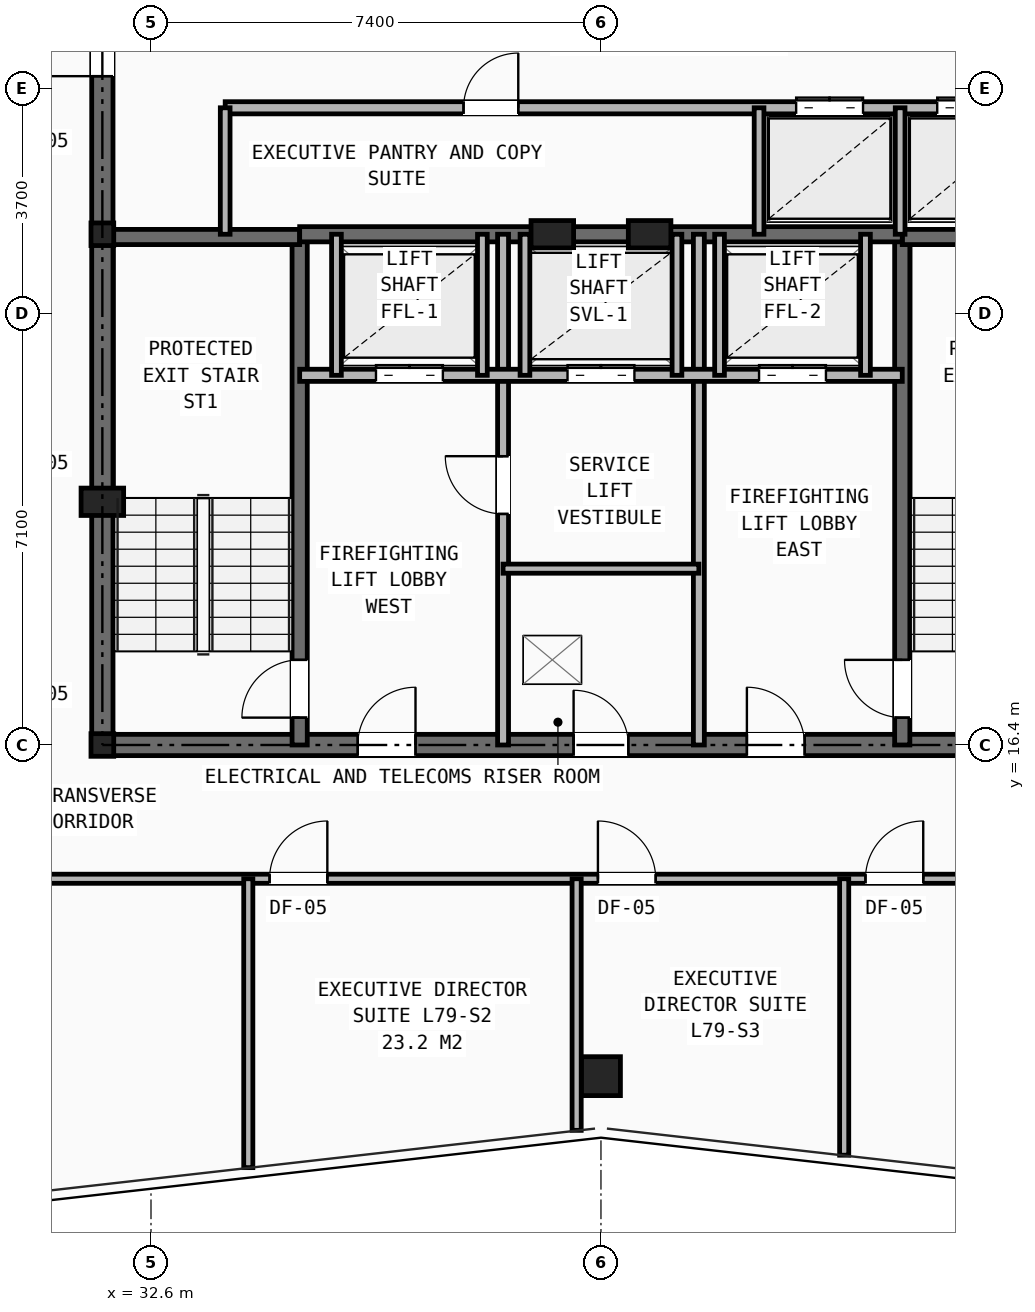
"""IFC4 building model, lengths in metres.
Left out: names, types, materials, properties, quantities, classifications, styles, units other than length and angle.
Written with IfcOpenShell. Run it as: python <this file> out.ifc"""

import sys

from ifc_helpers import new_model, si_unit, direction, frame, frame_2d, origin, origin_2d, place, context, subcontext, project, spatial, rectangle, hollow_rectangle, i_section, extrude, element, fill, save


model = new_model("IFC4")
c1 = context("Model", 3, precision=1e-05, world=origin(), true_north=direction((0.0, 1.0)))
c2 = subcontext(c1, "Body", "Model", "MODEL_VIEW")
j1 = project(units=[si_unit("LENGTHUNIT", "METRE"), si_unit("PLANEANGLEUNIT", "RADIAN")], contexts=[c1])
p1 = place(None, origin())
s1 = spatial("IfcSite", under=j1, at=p1, CompositionType="ELEMENT")
p2 = place(p1, origin())
s2 = spatial("IfcBuilding", under=s1, at=p2, CompositionType="ELEMENT")
p3 = place(p2, frame((0.0, 0.0, 279.5)))
s3 = spatial("IfcBuildingStorey", under=s2, at=p3, CompositionType="ELEMENT", Elevation=279.5)
for number, where, z_axis, x_axis in (
    (1, (31.8, 16.4, 0.0), (0.0, 0.0, 1.0), (1.0, 0.0, 0.0)),
    (2, (31.8, 24.8, 0.0), (0.0, 0.0, 1.0), (1.0, 0.0, 0.0)),
):
    element("IfcColumn", number, at=place(p3, frame(where, z_axis=z_axis, x_axis=x_axis)), inside=s3, PredefinedType="COLUMN", context=c2, shape_type="SweptSolid", body=[
        extrude(i_section(OverallWidth=0.374, OverallDepth=0.372, WebThickness=0.016, FlangeThickness=0.026, at=origin_2d()), origin(), (0.0, 0.0, 1.0), 3.5),
    ])
for number, where, z_axis, x_axis in (
    (3, (31.8, 20.4, 0.0), (0.0, 0.0, 1.0), (1.0, 0.0, 0.0)),
    (4, (39.2, 24.8, 0.0), (0.0, 0.0, 1.0), (1.0, 0.0, 0.0)),
    (5, (40.8, 24.8, 0.0), (0.0, 0.0, 1.0), (1.0, 0.0, 0.0)),
):
    element("IfcColumn", number, at=place(p3, frame(where, z_axis=z_axis, x_axis=x_axis)), inside=s3, PredefinedType="PILASTER", context=c2, shape_type="SweptSolid", body=[
        extrude(rectangle(XDim=0.7, YDim=0.45, at=origin_2d()), origin(), (0.0, 0.0, 1.0), 3.5),
    ])
p4 = place(p3, frame((40.0, 10.953, 0.0), z_axis=(0.0, 0.0, 1.0), x_axis=(1.0, 0.0, 0.0)))
e6 = element("IfcColumn", 6, at=p4, inside=s3, PredefinedType="COLUMN", context=c2, shape_type="SweptSolid", body=[
    extrude(hollow_rectangle(XDim=0.64, YDim=0.64, WallThickness=0.045, at=origin_2d()), origin(), (0.0, 0.0, 1.0), 3.5),
])
p5 = place(p3, frame((31.8, 16.4, 0.0), z_axis=(0.0, 0.0, 1.0), x_axis=(1.0, 0.0, 0.0)))
e7 = element("IfcWall", 7, at=p5, inside=s3, PredefinedType="SHEAR", context=c2, shape_type="SweptSolid", body=[
    extrude(rectangle(XDim=16.4, YDim=0.35, at=frame_2d((8.2, 0.0))), origin(), (0.0, 0.0, 1.0), 3.25),
])
p6 = place(p5, frame((7.75, 0.0, 0.0)))
e8 = element("IfcOpeningElement", 8, at=p6, cuts=e7, PredefinedType="OPENING", context=c2, shape_type="SweptSolid", body=[
    extrude(rectangle(XDim=0.9, YDim=2.1, at=frame_2d((0.45, 1.05))), frame((0.0, 0.185, 0.0), z_axis=(0.0, -1.0, 0.0), x_axis=(1.0, 0.0, 0.0)), (0.0, 0.0, 1.0), 0.37),
])
p7 = place(p5, frame((4.2, 0.0, 0.0)))
e9 = element("IfcOpeningElement", 9, at=p7, cuts=e7, PredefinedType="OPENING", context=c2, shape_type="SweptSolid", body=[
    extrude(rectangle(XDim=0.95, YDim=2.1, at=frame_2d((0.475, 1.05))), frame((0.0, 0.185, 0.0), z_axis=(0.0, -1.0, 0.0), x_axis=(1.0, 0.0, 0.0)), (0.0, 0.0, 1.0), 0.37),
])
p8 = place(p5, frame((10.6, 0.0, 0.0)))
e10 = element("IfcOpeningElement", 10, at=p8, cuts=e7, PredefinedType="OPENING", context=c2, shape_type="SweptSolid", body=[
    extrude(rectangle(XDim=0.95, YDim=2.1, at=frame_2d((0.475, 1.05))), frame((0.0, 0.185, 0.0), z_axis=(0.0, -1.0, 0.0), x_axis=(1.0, 0.0, 0.0)), (0.0, 0.0, 1.0), 0.37),
])
p9 = place(p3, frame((31.8, 16.4, 0.0), z_axis=(0.0, 0.0, 1.0), x_axis=(0.0, 1.0, 0.0)))
e11 = element("IfcWall", 11, at=p9, inside=s3, PredefinedType="SHEAR", context=c2, shape_type="SweptSolid", body=[
    extrude(rectangle(XDim=14.8, YDim=0.35, at=frame_2d((7.4, 0.0))), origin(), (0.0, 0.0, 1.0), 3.25),
])
p10 = place(p9, frame((11.0, 0.0, 0.0)))
e12 = element("IfcOpeningElement", 12, at=p10, cuts=e11, PredefinedType="OPENING", context=c2, shape_type="SweptSolid", body=[
    extrude(rectangle(XDim=1.1, YDim=2.15, at=frame_2d((0.55, 1.075))), frame((0.0, 0.185, 0.0), z_axis=(0.0, -1.0, 0.0), x_axis=(1.0, 0.0, 0.0)), (0.0, 0.0, 1.0), 0.37),
])
p11 = place(p3, frame((35.045, 16.4, 0.0), z_axis=(0.0, 0.0, 1.0), x_axis=(0.0, 1.0, 0.0)))
e13 = element("IfcWall", 13, at=p11, inside=s3, PredefinedType="SHEAR", context=c2, shape_type="SweptSolid", body=[
    extrude(rectangle(XDim=8.4, YDim=0.25, at=frame_2d((4.2, 0.0))), origin(), (0.0, 0.0, 1.0), 3.25),
])
p12 = place(p11, frame((0.45, 0.0, 0.0)))
e14 = element("IfcOpeningElement", 14, at=p12, cuts=e13, PredefinedType="OPENING", context=c2, shape_type="SweptSolid", body=[
    extrude(rectangle(XDim=0.95, YDim=2.1, at=frame_2d((0.475, 1.05))), frame((0.0, 0.135, 0.0), z_axis=(0.0, -1.0, 0.0), x_axis=(1.0, 0.0, 0.0)), (0.0, 0.0, 1.0), 0.27),
])
p13 = place(p3, frame((31.8, 24.755, 0.0), z_axis=(0.0, 0.0, 1.0), x_axis=(1.0, 0.0, 0.0)))
e15 = element("IfcWall", 15, at=p13, inside=s3, PredefinedType="SHEAR", context=c2, shape_type="SweptSolid", body=[
    extrude(rectangle(XDim=3.245, YDim=0.25, at=frame_2d((1.623, 0.0))), origin(), (0.0, 0.0, 1.0), 3.25),
])
p14 = place(p3, frame((44.955, 16.4, 0.0), z_axis=(0.0, 0.0, 1.0), x_axis=(0.0, 1.0, 0.0)))
e16 = element("IfcWall", 16, at=p14, inside=s3, PredefinedType="SHEAR", context=c2, shape_type="SweptSolid", body=[
    extrude(rectangle(XDim=8.4, YDim=0.25, at=frame_2d((4.2, 0.0))), origin(), (0.0, 0.0, 1.0), 3.25),
])
p15 = place(p14, frame((0.45, 0.0, 0.0)))
e17 = element("IfcOpeningElement", 17, at=p15, cuts=e16, PredefinedType="OPENING", context=c2, shape_type="SweptSolid", body=[
    extrude(rectangle(XDim=0.95, YDim=2.1, at=frame_2d((0.475, 1.05))), frame((0.0, 0.135, 0.0), z_axis=(0.0, -1.0, 0.0), x_axis=(1.0, 0.0, 0.0)), (0.0, 0.0, 1.0), 0.27),
])
p16 = place(p3, frame((44.955, 24.755, 0.0), z_axis=(0.0, 0.0, 1.0), x_axis=(1.0, 0.0, 0.0)))
e18 = element("IfcWall", 18, at=p16, inside=s3, PredefinedType="SHEAR", context=c2, shape_type="SweptSolid", body=[
    extrude(rectangle(XDim=3.245, YDim=0.25, at=frame_2d((1.623, 0.0))), origin(), (0.0, 0.0, 1.0), 3.25),
])
p17 = place(p3, frame((35.045, 24.8, 0.0), z_axis=(0.0, 0.0, 1.0), x_axis=(1.0, 0.0, 0.0)))
e19 = element("IfcWall", 19, at=p17, inside=s3, PredefinedType="SHEAR", context=c2, shape_type="SweptSolid", body=[
    extrude(rectangle(XDim=9.91, YDim=0.25, at=frame_2d((4.955, 0.0))), origin(), (0.0, 0.0, 1.0), 3.25),
])
p18 = place(p3, frame((38.39, 16.4, 0.0), z_axis=(0.0, 0.0, 1.0), x_axis=(0.0, 1.0, 0.0)))
e20 = element("IfcWall", 20, at=p18, inside=s3, PredefinedType="PARTITIONING", context=c2, shape_type="SweptSolid", body=[
    extrude(rectangle(XDim=8.4, YDim=0.18, at=frame_2d((4.2, 0.0))), origin(), (0.0, 0.0, 1.0), 2.705),
])
p19 = place(p18, frame((3.8, 0.0, 0.0)))
e21 = element("IfcOpeningElement", 21, at=p19, cuts=e20, PredefinedType="OPENING", context=c2, shape_type="SweptSolid", body=[
    extrude(rectangle(XDim=0.95, YDim=2.1, at=frame_2d((0.475, 1.05))), frame((0.0, 0.1, 0.0), z_axis=(0.0, -1.0, 0.0), x_axis=(1.0, 0.0, 0.0)), (0.0, 0.0, 1.0), 0.2),
])
p20 = place(p3, frame((41.61, 16.4, 0.0), z_axis=(0.0, 0.0, 1.0), x_axis=(0.0, 1.0, 0.0)))
e22 = element("IfcWall", 22, at=p20, inside=s3, PredefinedType="PARTITIONING", context=c2, shape_type="SweptSolid", body=[
    extrude(rectangle(XDim=8.4, YDim=0.18, at=frame_2d((4.2, 0.0))), origin(), (0.0, 0.0, 1.0), 2.705),
])
p21 = place(p3, frame((35.045, 22.48, 0.0), z_axis=(0.0, 0.0, 1.0), x_axis=(1.0, 0.0, 0.0)))
e23 = element("IfcWall", 23, at=p21, inside=s3, PredefinedType="SOLIDWALL", context=c2, shape_type="SweptSolid", body=[
    extrude(rectangle(XDim=9.91, YDim=0.2, at=frame_2d((4.955, 0.0))), origin(), (0.0, 0.0, 1.0), 3.25),
])
p22 = place(p21, frame((1.255, 0.0, 0.0)))
e24 = element("IfcOpeningElement", 24, at=p22, cuts=e23, PredefinedType="OPENING", context=c2, shape_type="SweptSolid", body=[
    extrude(rectangle(XDim=1.1, YDim=2.15, at=frame_2d((0.55, 1.075))), frame((0.0, 0.11, 0.0), z_axis=(0.0, -1.0, 0.0), x_axis=(1.0, 0.0, 0.0)), (0.0, 0.0, 1.0), 0.22),
])
p23 = place(p21, frame((7.555, 0.0, 0.0)))
e25 = element("IfcOpeningElement", 25, at=p23, cuts=e23, PredefinedType="OPENING", context=c2, shape_type="SweptSolid", body=[
    extrude(rectangle(XDim=1.1, YDim=2.15, at=frame_2d((0.55, 1.075))), frame((0.0, 0.11, 0.0), z_axis=(0.0, -1.0, 0.0), x_axis=(1.0, 0.0, 0.0)), (0.0, 0.0, 1.0), 0.22),
])
p24 = place(p21, frame((4.405, 0.0, 0.0)))
e26 = element("IfcOpeningElement", 26, at=p24, cuts=e23, PredefinedType="OPENING", context=c2, shape_type="SweptSolid", body=[
    extrude(rectangle(XDim=1.1, YDim=2.15, at=frame_2d((0.55, 1.075))), frame((0.0, 0.11, 0.0), z_axis=(0.0, -1.0, 0.0), x_axis=(1.0, 0.0, 0.0)), (0.0, 0.0, 1.0), 0.22),
])
p25 = place(p3, frame((38.39, 19.3, 0.0), z_axis=(0.0, 0.0, 1.0), x_axis=(1.0, 0.0, 0.0)))
e27 = element("IfcWall", 27, at=p25, inside=s3, PredefinedType="PARTITIONING", context=c2, shape_type="SweptSolid", body=[
    extrude(rectangle(XDim=3.22, YDim=0.15, at=frame_2d((1.61, 0.0))), origin(), (0.0, 0.0, 1.0), 3.25),
])
for number, where, z_axis, x_axis in (
    (28, (35.65, 22.48, 0.0), (0.0, 0.0, 1.0), (0.0, 1.0, 0.0)),
    (29, (38.05, 22.48, 0.0), (0.0, 0.0, 1.0), (0.0, 1.0, 0.0)),
    (30, (41.95, 22.48, 0.0), (0.0, 0.0, 1.0), (0.0, 1.0, 0.0)),
    (31, (44.35, 22.48, 0.0), (0.0, 0.0, 1.0), (0.0, 1.0, 0.0)),
    (32, (38.75, 22.48, 0.0), (0.0, 0.0, 1.0), (0.0, 1.0, 0.0)),
    (33, (41.25, 22.48, 0.0), (0.0, 0.0, 1.0), (0.0, 1.0, 0.0)),
):
    element("IfcWall", number, at=place(p3, frame(where, z_axis=z_axis, x_axis=x_axis)), inside=s3, PredefinedType="SOLIDWALL", context=c2, shape_type="SweptSolid", body=[
        extrude(rectangle(XDim=2.32, YDim=0.16, at=frame_2d((1.16, 0.0))), origin(), (0.0, 0.0, 1.0), 3.25),
    ])
p26 = place(p3, frame((33.82, 26.88, 0.0), z_axis=(0.0, 0.0, 1.0), x_axis=(1.0, 0.0, 0.0)))
e34 = element("IfcWall", 34, at=p26, inside=s3, PredefinedType="SOLIDWALL", context=c2, shape_type="SweptSolid", body=[
    extrude(rectangle(XDim=14.38, YDim=0.2, at=frame_2d((7.19, 0.0))), origin(), (0.0, 0.0, 1.0), 2.705),
])
p27 = place(p26, frame((3.92, 0.0, 0.0)))
e35 = element("IfcOpeningElement", 35, at=p27, cuts=e34, PredefinedType="OPENING", context=c2, shape_type="SweptSolid", body=[
    extrude(rectangle(XDim=0.9, YDim=2.1, at=frame_2d((0.45, 1.05))), frame((0.0, 0.11, 0.0), z_axis=(0.0, -1.0, 0.0), x_axis=(1.0, 0.0, 0.0)), (0.0, 0.0, 1.0), 0.22),
])
p28 = place(p26, frame((9.39, 0.0, 0.0)))
e36 = element("IfcOpeningElement", 36, at=p28, cuts=e34, PredefinedType="OPENING", context=c2, shape_type="SweptSolid", body=[
    extrude(rectangle(XDim=1.1, YDim=2.15, at=frame_2d((0.55, 1.075))), frame((0.0, 0.11, 0.0), z_axis=(0.0, -1.0, 0.0), x_axis=(1.0, 0.0, 0.0)), (0.0, 0.0, 1.0), 0.22),
])
p29 = place(p26, frame((11.71, 0.0, 0.0)))
e37 = element("IfcOpeningElement", 37, at=p29, cuts=e34, PredefinedType="OPENING", context=c2, shape_type="SweptSolid", body=[
    extrude(rectangle(XDim=1.1, YDim=2.15, at=frame_2d((0.55, 1.075))), frame((0.0, 0.11, 0.0), z_axis=(0.0, -1.0, 0.0), x_axis=(1.0, 0.0, 0.0)), (0.0, 0.0, 1.0), 0.22),
])
for number, where, z_axis, x_axis in (
    (38, (33.82, 24.8, 0.0), (0.0, 0.0, 1.0), (0.0, 1.0, 0.0)),
    (39, (42.6, 24.8, 0.0), (0.0, 0.0, 1.0), (0.0, 1.0, 0.0)),
    (40, (44.92, 24.8, 0.0), (0.0, 0.0, 1.0), (0.0, 1.0, 0.0)),
):
    element("IfcWall", number, at=place(p3, frame(where, z_axis=z_axis, x_axis=x_axis)), inside=s3, PredefinedType="SOLIDWALL", context=c2, shape_type="SweptSolid", body=[
        extrude(rectangle(XDim=2.08, YDim=0.16, at=frame_2d((1.04, 0.0))), origin(), (0.0, 0.0, 1.0), 3.25),
    ])
p30 = place(p3, frame((25.5, 14.2, 0.0), z_axis=(0.0, 0.0, 1.0), x_axis=(1.0, 0.0, 0.0)))
e41 = element("IfcWall", 41, at=p30, inside=s3, PredefinedType="PARTITIONING", context=c2, shape_type="SweptSolid", body=[
    extrude(rectangle(XDim=29.0, YDim=0.15, at=frame_2d((14.5, 0.0))), origin(), (0.0, 0.0, 1.0), 2.292),
])
p31 = place(p30, frame((0.85, 0.0, 0.0)))
e42 = element("IfcOpeningElement", 42, at=p31, cuts=e41, PredefinedType="OPENING", context=c2, shape_type="SweptSolid", body=[
    extrude(rectangle(XDim=0.95, YDim=2.1, at=frame_2d((0.475, 1.05))), frame((0.0, 0.085, 0.0), z_axis=(0.0, -1.0, 0.0), x_axis=(1.0, 0.0, 0.0)), (0.0, 0.0, 1.0), 0.17),
])
p32 = place(p30, frame((9.05, 0.0, 0.0)))
e43 = element("IfcOpeningElement", 43, at=p32, cuts=e41, PredefinedType="OPENING", context=c2, shape_type="SweptSolid", body=[
    extrude(rectangle(XDim=0.95, YDim=2.1, at=frame_2d((0.475, 1.05))), frame((0.0, 0.085, 0.0), z_axis=(0.0, -1.0, 0.0), x_axis=(1.0, 0.0, 0.0)), (0.0, 0.0, 1.0), 0.17),
])
p33 = place(p30, frame((14.45, 0.0, 0.0)))
e44 = element("IfcOpeningElement", 44, at=p33, cuts=e41, PredefinedType="OPENING", context=c2, shape_type="SweptSolid", body=[
    extrude(rectangle(XDim=0.95, YDim=2.1, at=frame_2d((0.475, 1.05))), frame((0.0, 0.085, 0.0), z_axis=(0.0, -1.0, 0.0), x_axis=(1.0, 0.0, 0.0)), (0.0, 0.0, 1.0), 0.17),
])
p34 = place(p30, frame((18.85, 0.0, 0.0)))
e45 = element("IfcOpeningElement", 45, at=p34, cuts=e41, PredefinedType="OPENING", context=c2, shape_type="SweptSolid", body=[
    extrude(rectangle(XDim=0.95, YDim=2.1, at=frame_2d((0.475, 1.05))), frame((0.0, 0.085, 0.0), z_axis=(0.0, -1.0, 0.0), x_axis=(1.0, 0.0, 0.0)), (0.0, 0.0, 1.0), 0.17),
])
p35 = place(p3, frame((34.2, 9.449, 0.0), z_axis=(0.0, 0.0, 1.0), x_axis=(0.0, 1.0, 0.0)))
e46 = element("IfcWall", 46, at=p35, inside=s3, PredefinedType="PARTITIONING", context=c2, shape_type="SweptSolid", body=[
    extrude(rectangle(XDim=4.751, YDim=0.15, at=frame_2d((2.375, 0.0))), origin(), (0.0, 0.0, 1.0), 2.628),
])
p36 = place(p3, frame((39.6, 10.062, 0.0), z_axis=(0.0, 0.0, 1.0), x_axis=(0.0, 1.0, 0.0)))
e47 = element("IfcWall", 47, at=p36, inside=s3, PredefinedType="PARTITIONING", context=c2, shape_type="SweptSolid", body=[
    extrude(rectangle(XDim=4.138, YDim=0.15, at=frame_2d((2.069, 0.0))), origin(), (0.0, 0.0, 1.0), 2.292),
])
p37 = place(p3, frame((44.0, 9.653, 0.0), z_axis=(0.0, 0.0, 1.0), x_axis=(0.0, 1.0, 0.0)))
e48 = element("IfcWall", 48, at=p37, inside=s3, PredefinedType="PARTITIONING", context=c2, shape_type="SweptSolid", body=[
    extrude(rectangle(XDim=4.547, YDim=0.15, at=frame_2d((2.273, 0.0))), origin(), (0.0, 0.0, 1.0), 2.628),
])
p38 = place(p6, origin())
e49 = element("IfcDoor", 49, at=p38, inside=s3, OperationType="SINGLE_SWING_LEFT", PredefinedType="DOOR", context=c2, shape_type="SweptSolid", body=[
    extrude(rectangle(XDim=0.9, YDim=2.1, at=frame_2d((0.45, 1.05))), frame((0.0, 0.025, 0.0), z_axis=(0.0, -1.0, 0.0), x_axis=(1.0, 0.0, 0.0)), (0.0, 0.0, 1.0), 0.05),
])
fill(e8, e49)
p39 = place(p19, origin())
e50 = element("IfcDoor", 50, at=p39, inside=s3, OperationType="SINGLE_SWING_RIGHT", PredefinedType="DOOR", context=c2, shape_type="SweptSolid", body=[
    extrude(rectangle(XDim=0.95, YDim=2.1, at=frame_2d((0.475, 1.05))), frame((0.0, 0.025, 0.0), z_axis=(0.0, -1.0, 0.0), x_axis=(1.0, 0.0, 0.0)), (0.0, 0.0, 1.0), 0.05),
])
fill(e21, e50)
p40 = place(p12, origin())
e51 = element("IfcDoor", 51, at=p40, inside=s3, OperationType="SINGLE_SWING_LEFT", PredefinedType="DOOR", context=c2, shape_type="SweptSolid", body=[
    extrude(rectangle(XDim=0.95, YDim=2.1, at=frame_2d((0.475, 1.05))), frame((0.0, 0.025, 0.0), z_axis=(0.0, -1.0, 0.0), x_axis=(1.0, 0.0, 0.0)), (0.0, 0.0, 1.0), 0.05),
])
fill(e14, e51)
p41 = place(p15, origin())
e52 = element("IfcDoor", 52, at=p41, inside=s3, OperationType="SINGLE_SWING_RIGHT", PredefinedType="DOOR", context=c2, shape_type="SweptSolid", body=[
    extrude(rectangle(XDim=0.95, YDim=2.1, at=frame_2d((0.475, 1.05))), frame((0.0, 0.025, 0.0), z_axis=(0.0, -1.0, 0.0), x_axis=(1.0, 0.0, 0.0)), (0.0, 0.0, 1.0), 0.05),
])
fill(e17, e52)
p42 = place(p7, origin())
e53 = element("IfcDoor", 53, at=p42, inside=s3, OperationType="SINGLE_SWING_RIGHT", PredefinedType="DOOR", context=c2, shape_type="SweptSolid", body=[
    extrude(rectangle(XDim=0.95, YDim=2.1, at=frame_2d((0.475, 1.05))), frame((0.0, 0.025, 0.0), z_axis=(0.0, -1.0, 0.0), x_axis=(1.0, 0.0, 0.0)), (0.0, 0.0, 1.0), 0.05),
])
fill(e9, e53)
p43 = place(p8, origin())
e54 = element("IfcDoor", 54, at=p43, inside=s3, OperationType="SINGLE_SWING_LEFT", PredefinedType="DOOR", context=c2, shape_type="SweptSolid", body=[
    extrude(rectangle(XDim=0.95, YDim=2.1, at=frame_2d((0.475, 1.05))), frame((0.0, 0.025, 0.0), z_axis=(0.0, -1.0, 0.0), x_axis=(1.0, 0.0, 0.0)), (0.0, 0.0, 1.0), 0.05),
])
fill(e10, e54)
p44 = place(p22, origin())
e55 = element("IfcDoor", 55, at=p44, inside=s3, OperationType="DOUBLE_DOOR_SLIDING", PredefinedType="DOOR", context=c2, shape_type="SweptSolid", body=[
    extrude(rectangle(XDim=1.1, YDim=2.15, at=frame_2d((0.55, 1.075))), frame((0.0, 0.025, 0.0), z_axis=(0.0, -1.0, 0.0), x_axis=(1.0, 0.0, 0.0)), (0.0, 0.0, 1.0), 0.05),
])
fill(e24, e55)
p45 = place(p23, origin())
e56 = element("IfcDoor", 56, at=p45, inside=s3, OperationType="DOUBLE_DOOR_SLIDING", PredefinedType="DOOR", context=c2, shape_type="SweptSolid", body=[
    extrude(rectangle(XDim=1.1, YDim=2.15, at=frame_2d((0.55, 1.075))), frame((0.0, 0.025, 0.0), z_axis=(0.0, -1.0, 0.0), x_axis=(1.0, 0.0, 0.0)), (0.0, 0.0, 1.0), 0.05),
])
fill(e25, e56)
p46 = place(p24, origin())
e57 = element("IfcDoor", 57, at=p46, inside=s3, OperationType="DOUBLE_DOOR_SLIDING", PredefinedType="DOOR", context=c2, shape_type="SweptSolid", body=[
    extrude(rectangle(XDim=1.1, YDim=2.15, at=frame_2d((0.55, 1.075))), frame((0.0, 0.025, 0.0), z_axis=(0.0, -1.0, 0.0), x_axis=(1.0, 0.0, 0.0)), (0.0, 0.0, 1.0), 0.05),
])
fill(e26, e57)
p47 = place(p10, origin())
e58 = element("IfcDoor", 58, at=p47, inside=s3, OperationType="SINGLE_SWING_LEFT", PredefinedType="DOOR", context=c2, shape_type="SweptSolid", body=[
    extrude(rectangle(XDim=1.1, YDim=2.15, at=frame_2d((0.55, 1.075))), frame((0.0, 0.025, 0.0), z_axis=(0.0, -1.0, 0.0), x_axis=(1.0, 0.0, 0.0)), (0.0, 0.0, 1.0), 0.05),
])
fill(e12, e58)
p48 = place(p27, origin())
e59 = element("IfcDoor", 59, at=p48, inside=s3, OperationType="SINGLE_SWING_RIGHT", PredefinedType="DOOR", context=c2, shape_type="SweptSolid", body=[
    extrude(rectangle(XDim=0.9, YDim=2.1, at=frame_2d((0.45, 1.05))), frame((0.0, 0.025, 0.0), z_axis=(0.0, -1.0, 0.0), x_axis=(1.0, 0.0, 0.0)), (0.0, 0.0, 1.0), 0.05),
])
fill(e35, e59)
p49 = place(p28, origin())
e60 = element("IfcDoor", 60, at=p49, inside=s3, OperationType="DOUBLE_DOOR_SLIDING", PredefinedType="DOOR", context=c2, shape_type="SweptSolid", body=[
    extrude(rectangle(XDim=1.1, YDim=2.15, at=frame_2d((0.55, 1.075))), frame((0.0, 0.025, 0.0), z_axis=(0.0, -1.0, 0.0), x_axis=(1.0, 0.0, 0.0)), (0.0, 0.0, 1.0), 0.05),
])
fill(e36, e60)
p50 = place(p29, origin())
e61 = element("IfcDoor", 61, at=p50, inside=s3, OperationType="DOUBLE_DOOR_SLIDING", PredefinedType="DOOR", context=c2, shape_type="SweptSolid", body=[
    extrude(rectangle(XDim=1.1, YDim=2.15, at=frame_2d((0.55, 1.075))), frame((0.0, 0.025, 0.0), z_axis=(0.0, -1.0, 0.0), x_axis=(1.0, 0.0, 0.0)), (0.0, 0.0, 1.0), 0.05),
])
fill(e37, e61)
p51 = place(p32, origin())
e62 = element("IfcDoor", 62, at=p51, inside=s3, OperationType="SINGLE_SWING_RIGHT", PredefinedType="DOOR", context=c2, shape_type="SweptSolid", body=[
    extrude(rectangle(XDim=0.95, YDim=2.1, at=frame_2d((0.475, 1.05))), frame((0.0, 0.025, 0.0), z_axis=(0.0, -1.0, 0.0), x_axis=(1.0, 0.0, 0.0)), (0.0, 0.0, 1.0), 0.05),
])
fill(e43, e62)
p52 = place(p33, origin())
e63 = element("IfcDoor", 63, at=p52, inside=s3, OperationType="SINGLE_SWING_LEFT", PredefinedType="DOOR", context=c2, shape_type="SweptSolid", body=[
    extrude(rectangle(XDim=0.95, YDim=2.1, at=frame_2d((0.475, 1.05))), frame((0.0, 0.025, 0.0), z_axis=(0.0, -1.0, 0.0), x_axis=(1.0, 0.0, 0.0)), (0.0, 0.0, 1.0), 0.05),
])
fill(e44, e63)
p53 = place(p34, origin())
e64 = element("IfcDoor", 64, at=p53, inside=s3, OperationType="SINGLE_SWING_RIGHT", PredefinedType="DOOR", context=c2, shape_type="SweptSolid", body=[
    extrude(rectangle(XDim=0.95, YDim=2.1, at=frame_2d((0.475, 1.05))), frame((0.0, 0.025, 0.0), z_axis=(0.0, -1.0, 0.0), x_axis=(1.0, 0.0, 0.0)), (0.0, 0.0, 1.0), 0.05),
])
fill(e45, e64)
save(model, sys.argv[1])
